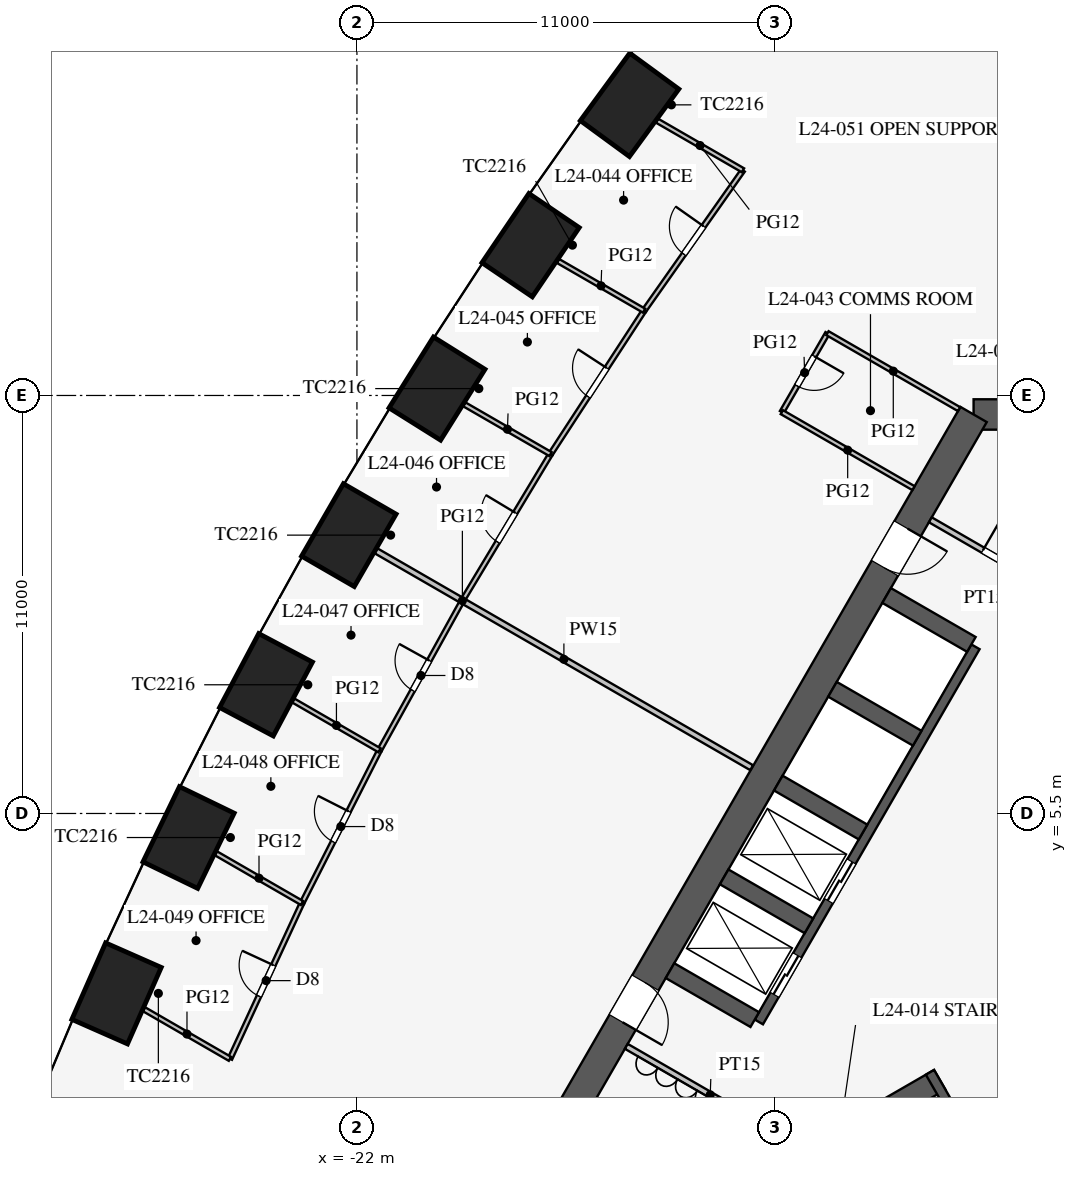
"""IFC4 building model, lengths in metres.
Left out: names, types, materials, properties, quantities, classifications, styles, units other than length and angle.
Written with IfcOpenShell. Run it as: python <this file> out.ifc"""

import sys

from ifc_helpers import new_model, si_unit, direction, frame, frame_2d, origin, origin_2d, place, context, subcontext, project, spatial, rectangle, extrude, element, fill, save


model = new_model("IFC4")
c1 = context("Model", 3, precision=1e-05, world=origin(), true_north=direction((0.0, 1.0)))
c2 = subcontext(c1, "Body", "Model", "MODEL_VIEW")
j1 = project(units=[si_unit("LENGTHUNIT", "METRE"), si_unit("PLANEANGLEUNIT", "RADIAN")], contexts=[c1])
p1 = place(None, origin())
s1 = spatial("IfcSite", under=j1, at=p1, CompositionType="ELEMENT")
p2 = place(p1, origin())
s2 = spatial("IfcBuilding", under=s1, at=p2, CompositionType="ELEMENT")
p3 = place(p2, frame((0.0, 0.0, 107.3)))
s3 = spatial("IfcBuildingStorey", under=s2, at=p3, CompositionType="ELEMENT", Elevation=107.3)
for number, where, z_axis, x_axis in (
    (1, (-14.825, 24.148, 0.0), (0.0, 0.0, 1.0), (-0.591, -0.807, 0.0)),
    (2, (-17.43, 20.456, 0.0), (0.0, 0.0, 1.0), (-0.561, -0.828, 0.0)),
    (3, (-19.893, 16.681, 0.0), (0.0, 0.0, 1.0), (-0.531, -0.847, 0.0)),
    (4, (-22.213, 12.825, 0.0), (0.0, 0.0, 1.0), (-0.5, -0.866, 0.0)),
    (5, (-24.393, 8.887, 0.0), (0.0, 0.0, 1.0), (-0.468, -0.883, 0.0)),
    (6, (-26.43, 4.867, 0.0), (0.0, 0.0, 1.0), (-0.436, -0.9, 0.0)),
    (7, (-28.325, 0.765, 0.0), (0.0, 0.0, 1.0), (-0.403, -0.915, 0.0)),
):
    element("IfcColumn", number, at=place(p3, frame(where, z_axis=z_axis, x_axis=x_axis)), inside=s3, PredefinedType="COLUMN", context=c2, shape_type="SweptSolid", body=[
        extrude(rectangle(XDim=2.2, YDim=1.6, at=origin_2d()), origin(), (0.0, 0.0, 1.0), 4.2),
    ])
p4 = place(p3, frame((5.773, 16.0, 0.0), z_axis=(0.0, 0.0, 1.0), x_axis=(-1.0, 0.0, 0.0)))
e8 = element("IfcWall", 8, at=p4, inside=s3, PredefinedType="SHEAR", context=c2, shape_type="SweptSolid", body=[
    extrude(rectangle(XDim=11.547, YDim=0.8, at=frame_2d((5.773, 0.0))), origin(), (0.0, 0.0, 1.0), 4.2),
])
p5 = place(p3, frame((-5.773, 16.0, 0.0), z_axis=(0.0, 0.0, 1.0), x_axis=(-0.500002442456, -0.866023993627, 0.0)))
e9 = element("IfcWall", 9, at=p5, inside=s3, PredefinedType="SHEAR", context=c2, shape_type="SweptSolid", body=[
    extrude(rectangle(XDim=21.939, YDim=0.8, at=frame_2d((10.97, 0.0))), origin(), (0.0, 0.0, 1.0), 4.2),
])
p6 = place(p5, frame((17.27, 0.0, 0.0)))
e10 = element("IfcOpeningElement", 10, at=p6, cuts=e9, PredefinedType="OPENING", context=c2, shape_type="SweptSolid", body=[
    extrude(rectangle(XDim=1.2, YDim=2.1, at=frame_2d((0.6, 1.05))), frame((0.0, 0.41, 0.0), z_axis=(0.0, -1.0, 0.0), x_axis=(1.0, 0.0, 0.0)), (0.0, 0.0, 1.0), 0.82),
])
p7 = place(p5, frame((3.47, 0.0, 0.0)))
e11 = element("IfcOpeningElement", 11, at=p7, cuts=e9, PredefinedType="OPENING", context=c2, shape_type="SweptSolid", body=[
    extrude(rectangle(XDim=1.2, YDim=2.1, at=frame_2d((0.6, 1.05))), frame((0.0, 0.41, 0.0), z_axis=(0.0, -1.0, 0.0), x_axis=(1.0, 0.0, 0.0)), (0.0, 0.0, 1.0), 0.82),
])
p8 = place(p3, frame((-5.724, 9.886, 0.0), z_axis=(0.0, 0.0, 1.0), x_axis=(-0.500001763848, -0.866024385424, 0.0)))
e12 = element("IfcWall", 12, at=p8, inside=s3, PredefinedType="SHEAR", context=c2, shape_type="SweptSolid", body=[
    extrude(rectangle(XDim=11.4, YDim=0.25, at=frame_2d((5.7, 0.0))), origin(), (0.0, 0.0, 1.0), 4.2),
])
p9 = place(p8, frame((6.525, 0.0, 0.0)))
e13 = element("IfcOpeningElement", 13, at=p9, cuts=e12, PredefinedType="OPENING", context=c2, shape_type="SweptSolid", body=[
    extrude(rectangle(XDim=1.2, YDim=2.2, at=frame_2d((0.6, 1.1))), frame((0.0, 0.135, 0.0), z_axis=(0.0, -1.0, 0.0), x_axis=(1.0, 0.0, 0.0)), (0.0, 0.0, 1.0), 0.27),
])
p10 = place(p8, frame((9.375, 0.0, 0.0)))
e14 = element("IfcOpeningElement", 14, at=p10, cuts=e12, PredefinedType="OPENING", context=c2, shape_type="SweptSolid", body=[
    extrude(rectangle(XDim=1.2, YDim=2.2, at=frame_2d((0.6, 1.1))), frame((0.0, 0.135, 0.0), z_axis=(0.0, -1.0, 0.0), x_axis=(1.0, 0.0, 0.0)), (0.0, 0.0, 1.0), 0.27),
])
p11 = place(p3, frame((-5.832, 9.949, 0.0), z_axis=(0.0, 0.0, 1.0), x_axis=(-0.866029291668, 0.499993265928, 0.0)))
e15 = element("IfcWall", 15, at=p11, inside=s3, PredefinedType="SHEAR", context=c2, shape_type="SweptSolid", body=[
    extrude(rectangle(XDim=2.575, YDim=0.45, at=frame_2d((1.288, 0.0))), origin(), (0.0, 0.0, 1.0), 4.2),
])
for number, where, z_axis, x_axis in (
    (16, (-7.257, 7.481, 0.0), (0.0, 0.0, 1.0), (-0.866, 0.5, 0.0)),
    (17, (-8.682, 5.012, 0.0), (0.0, 0.0, 1.0), (-0.866, 0.5, 0.0)),
    (18, (-10.107, 2.544, 0.0), (0.0, 0.0, 1.0), (-0.866, 0.5, 0.0)),
    (19, (-11.532, 0.076, 0.0), (0.0, 0.0, 1.0), (-0.866, 0.5, 0.0)),
):
    element("IfcWall", number, at=place(p3, frame(where, z_axis=z_axis, x_axis=x_axis)), inside=s3, PredefinedType="SHEAR", context=c2, shape_type="SweptSolid", body=[
        extrude(rectangle(XDim=2.575, YDim=0.45, at=frame_2d((1.288, 0.0))), origin(), (0.0, 0.0, 1.0), 4.2),
    ])
p12 = place(p3, frame((-6.663, -1.509, 0.0), z_axis=(0.0, 0.0, 1.0), x_axis=(-0.866019375473, -0.500010441196, 0.0)))
e20 = element("IfcWall", 20, at=p12, inside=s3, PredefinedType="SHEAR", context=c2, shape_type="SweptSolid", body=[
    extrude(rectangle(XDim=9.075, YDim=0.6, at=frame_2d((4.538, 0.0))), origin(), (0.0, 0.0, 1.0), 4.2),
])
p13 = place(p3, frame((-6.922, -1.312, 0.0), z_axis=(0.0, 0.0, 1.0), x_axis=(0.499984536904, -0.866034331223, 0.0)))
e21 = element("IfcWall", 21, at=p13, inside=s3, PredefinedType="SHEAR", context=c2, shape_type="SweptSolid", body=[
    extrude(rectangle(XDim=4.65, YDim=0.25, at=frame_2d((2.325, 0.0))), origin(), (0.0, 0.0, 1.0), 4.2),
])
p14 = place(p13, frame((1.525, 0.0, 0.0)))
e22 = element("IfcOpeningElement", 22, at=p14, cuts=e21, PredefinedType="OPENING", context=c2, shape_type="SweptSolid", body=[
    extrude(rectangle(XDim=1.6, YDim=2.1, at=frame_2d((0.8, 1.05))), frame((0.0, 0.135, 0.0), z_axis=(0.0, -1.0, 0.0), x_axis=(1.0, 0.0, 0.0)), (0.0, 0.0, 1.0), 0.27),
])
p15 = place(p3, frame((-10.495, -3.178, 0.0), z_axis=(0.0, 0.0, 1.0), x_axis=(-0.86602216432, 0.500005610874, 0.0)))
e23 = element("IfcWall", 23, at=p15, inside=s3, PredefinedType="PARTITIONING", context=c2, shape_type="SweptSolid", body=[
    extrude(rectangle(XDim=5.1, YDim=0.15, at=frame_2d((2.55, 0.0))), origin(), (0.0, 0.0, 1.0), 4.0),
])
p16 = place(p15, frame((1.3, 0.0, 0.0)))
e24 = element("IfcOpeningElement", 24, at=p16, cuts=e23, PredefinedType="OPENING", context=c2, shape_type="SweptSolid", body=[
    extrude(rectangle(XDim=0.9, YDim=2.1, at=frame_2d((0.45, 1.05))), frame((0.0, 0.085, 0.0), z_axis=(0.0, -1.0, 0.0), x_axis=(1.0, 0.0, 0.0)), (0.0, 0.0, 1.0), 0.17),
])
p17 = place(p3, frame((-2.495, 10.678, 0.0), z_axis=(0.0, 0.0, 1.0), x_axis=(-0.86602216432, 0.500005610874, 0.0)))
e25 = element("IfcWall", 25, at=p17, inside=s3, PredefinedType="PARTITIONING", context=c2, shape_type="SweptSolid", body=[
    extrude(rectangle(XDim=5.1, YDim=0.15, at=frame_2d((2.55, 0.0))), origin(), (0.0, 0.0, 1.0), 4.0),
])
p18 = place(p17, frame((2.6, 0.0, 0.0)))
e26 = element("IfcOpeningElement", 26, at=p18, cuts=e25, PredefinedType="OPENING", context=c2, shape_type="SweptSolid", body=[
    extrude(rectangle(XDim=0.9, YDim=2.1, at=frame_2d((0.45, 1.05))), frame((0.0, 0.085, 0.0), z_axis=(0.0, -1.0, 0.0), x_axis=(1.0, 0.0, 0.0)), (0.0, 0.0, 1.0), 0.17),
])
p19 = place(p3, frame((-11.613, 6.705, 0.0), z_axis=(0.0, 0.0, 1.0), x_axis=(-0.866026306654, 0.499998436182, 0.0)))
e27 = element("IfcWall", 27, at=p19, inside=s3, PredefinedType="PARTITIONING", context=c2, shape_type="SweptSolid", body=[
    extrude(rectangle(XDim=11.41, YDim=0.15, at=frame_2d((5.705, 0.0))), origin(), (0.0, 0.0, 1.0), 2.8),
])
p20 = place(p3, frame((-9.619, 18.14, 0.0), z_axis=(0.0, 0.0, 1.0), x_axis=(-0.500001309137, -0.866024647952, 0.0)))
e28 = element("IfcWall", 28, at=p20, inside=s3, PredefinedType="PARTITIONING", context=c2, shape_type="SweptSolid", body=[
    extrude(rectangle(XDim=2.4, YDim=0.12, at=frame_2d((1.2, 0.0))), origin(), (0.0, 0.0, 1.0), 2.9),
])
p21 = place(p20, frame((0.7, 0.0, 0.15)))
e29 = element("IfcOpeningElement", 29, at=p21, cuts=e28, PredefinedType="OPENING", context=c2, shape_type="SweptSolid", body=[
    extrude(rectangle(XDim=0.9, YDim=2.1, at=frame_2d((0.45, 1.05))), frame((0.0, 0.07, 0.0), z_axis=(0.0, -1.0, 0.0), x_axis=(1.0, 0.0, 0.0)), (0.0, 0.0, 1.0), 0.14),
])
for number, where, z_axis, x_axis in (
    (30, (-6.155, 16.14, 0.0), (0.0, 0.0, 1.0), (-0.866, 0.5, 0.0)),
    (31, (-7.355, 14.061, 0.0), (0.0, 0.0, 1.0), (-0.866, 0.5, 0.0)),
):
    element("IfcWall", number, at=place(p3, frame(where, z_axis=z_axis, x_axis=x_axis)), inside=s3, PredefinedType="PARTITIONING", context=c2, shape_type="SweptSolid", body=[
        extrude(rectangle(XDim=4.0, YDim=0.12, at=frame_2d((2.0, 0.0))), origin(), (0.0, 0.0, 1.0), 2.9),
    ])
p22 = place(p3, frame((-19.226, 11.1, 0.0), z_axis=(0.0, 0.0, 1.0), x_axis=(-0.484292898211, -0.874905931368, 0.0)))
e32 = element("IfcWall", 32, at=p22, inside=s3, PredefinedType="PARTITIONING", context=c2, shape_type="SweptSolid", body=[
    extrude(rectangle(XDim=4.501, YDim=0.12, at=frame_2d((2.25, 0.0))), origin(), (0.0, 0.0, 1.0), 2.9),
])
p23 = place(p22, frame((1.8, 0.0, 0.15)))
e33 = element("IfcOpeningElement", 33, at=p23, cuts=e32, PredefinedType="OPENING", context=c2, shape_type="SweptSolid", body=[
    extrude(rectangle(XDim=0.9, YDim=2.1, at=frame_2d((0.45, 1.05))), frame((0.0, 0.07, 0.0), z_axis=(0.0, -1.0, 0.0), x_axis=(1.0, 0.0, 0.0)), (0.0, 0.0, 1.0), 0.14),
])
p24 = place(p3, frame((-21.405, 7.162, 0.0), z_axis=(0.0, 0.0, 1.0), x_axis=(-0.452471679136, -0.891778772779, 0.0)))
e34 = element("IfcWall", 34, at=p24, inside=s3, PredefinedType="PARTITIONING", context=c2, shape_type="SweptSolid", body=[
    extrude(rectangle(XDim=4.507, YDim=0.12, at=frame_2d((2.253, 0.0))), origin(), (0.0, 0.0, 1.0), 2.9),
])
p25 = place(p24, frame((1.8, 0.0, 0.15)))
e35 = element("IfcOpeningElement", 35, at=p25, cuts=e34, PredefinedType="OPENING", context=c2, shape_type="SweptSolid", body=[
    extrude(rectangle(XDim=0.9, YDim=2.1, at=frame_2d((0.45, 1.05))), frame((0.0, 0.07, 0.0), z_axis=(0.0, -1.0, 0.0), x_axis=(1.0, 0.0, 0.0)), (0.0, 0.0, 1.0), 0.14),
])
p26 = place(p3, frame((-23.444, 3.143, 0.0), z_axis=(0.0, 0.0, 1.0), x_axis=(-0.419883773418, -0.907577884713, 0.0)))
e36 = element("IfcWall", 36, at=p26, inside=s3, PredefinedType="PARTITIONING", context=c2, shape_type="SweptSolid", body=[
    extrude(rectangle(XDim=4.519, YDim=0.12, at=frame_2d((2.259, 0.0))), origin(), (0.0, 0.0, 1.0), 2.9),
])
p27 = place(p26, frame((1.8, 0.0, 0.15)))
e37 = element("IfcOpeningElement", 37, at=p27, cuts=e36, PredefinedType="OPENING", context=c2, shape_type="SweptSolid", body=[
    extrude(rectangle(XDim=0.9, YDim=2.1, at=frame_2d((0.45, 1.05))), frame((0.0, 0.07, 0.0), z_axis=(0.0, -1.0, 0.0), x_axis=(1.0, 0.0, 0.0)), (0.0, 0.0, 1.0), 0.14),
])
p28 = place(p3, frame((-11.842, 22.425, 0.0), z_axis=(0.0, 0.0, 1.0), x_axis=(-0.576023283708, -0.817433285734, 0.0)))
e38 = element("IfcWall", 38, at=p28, inside=s3, PredefinedType="PARTITIONING", context=c2, shape_type="SweptSolid", body=[
    extrude(rectangle(XDim=4.519, YDim=0.12, at=frame_2d((2.259, 0.0))), origin(), (0.0, 0.0, 1.0), 2.9),
])
p29 = place(p28, frame((1.8, 0.0, 0.15)))
e39 = element("IfcOpeningElement", 39, at=p29, cuts=e38, PredefinedType="OPENING", context=c2, shape_type="SweptSolid", body=[
    extrude(rectangle(XDim=0.9, YDim=2.1, at=frame_2d((0.45, 1.05))), frame((0.0, 0.07, 0.0), z_axis=(0.0, -1.0, 0.0), x_axis=(1.0, 0.0, 0.0)), (0.0, 0.0, 1.0), 0.14),
])
p30 = place(p3, frame((-16.905, 14.956, 0.0), z_axis=(0.0, 0.0, 1.0), x_axis=(-0.515548366618, -0.856860479703, 0.0)))
e40 = element("IfcWall", 40, at=p30, inside=s3, PredefinedType="PARTITIONING", context=c2, shape_type="SweptSolid", body=[
    extrude(rectangle(XDim=4.501, YDim=0.12, at=frame_2d((2.25, 0.0))), origin(), (0.0, 0.0, 1.0), 2.9),
])
p31 = place(p30, frame((1.8, 0.0, 0.15)))
e41 = element("IfcOpeningElement", 41, at=p31, cuts=e40, PredefinedType="OPENING", context=c2, shape_type="SweptSolid", body=[
    extrude(rectangle(XDim=0.9, YDim=2.1, at=frame_2d((0.45, 1.05))), frame((0.0, 0.07, 0.0), z_axis=(0.0, -1.0, 0.0), x_axis=(1.0, 0.0, 0.0)), (0.0, 0.0, 1.0), 0.14),
])
p32 = place(p3, frame((-14.444, 18.732, 0.0), z_axis=(0.0, 0.0, 1.0), x_axis=(-0.546069464151, -0.837739900161, 0.0)))
e42 = element("IfcWall", 42, at=p32, inside=s3, PredefinedType="PARTITIONING", context=c2, shape_type="SweptSolid", body=[
    extrude(rectangle(XDim=4.507, YDim=0.12, at=frame_2d((2.253, 0.0))), origin(), (0.0, 0.0, 1.0), 2.9),
])
p33 = place(p32, frame((1.8, 0.0, 0.15)))
e43 = element("IfcOpeningElement", 43, at=p33, cuts=e42, PredefinedType="OPENING", context=c2, shape_type="SweptSolid", body=[
    extrude(rectangle(XDim=0.9, YDim=2.1, at=frame_2d((0.45, 1.05))), frame((0.0, 0.07, 0.0), z_axis=(0.0, -1.0, 0.0), x_axis=(1.0, 0.0, 0.0)), (0.0, 0.0, 1.0), 0.14),
])
p34 = place(p3, frame((-25.342, -0.958, 0.0), z_axis=(0.0, 0.0, 1.0), x_axis=(-0.866036074319, 0.499981517636, 0.0)))
e44 = element("IfcWall", 44, at=p34, inside=s3, PredefinedType="PARTITIONING", context=c2, shape_type="SweptSolid", body=[
    extrude(rectangle(XDim=2.61, YDim=0.12, at=frame_2d((1.305, 0.0))), origin(), (0.0, 0.0, 1.0), 2.6),
])
p35 = place(p3, frame((-21.405, 7.162, 0.0), z_axis=(0.0, 0.0, 1.0), x_axis=(-0.866008611403, 0.50002908413, 0.0)))
e45 = element("IfcWall", 45, at=p35, inside=s3, PredefinedType="PARTITIONING", context=c2, shape_type="SweptSolid", body=[
    extrude(rectangle(XDim=2.619, YDim=0.12, at=frame_2d((1.31, 0.0))), origin(), (0.0, 0.0, 1.0), 2.8),
])
p36 = place(p3, frame((-23.444, 3.143, 0.0), z_axis=(0.0, 0.0, 1.0), x_axis=(-0.866011491631, 0.500024095782, 0.0)))
e46 = element("IfcWall", 46, at=p36, inside=s3, PredefinedType="PARTITIONING", context=c2, shape_type="SweptSolid", body=[
    extrude(rectangle(XDim=2.615, YDim=0.12, at=frame_2d((1.308, 0.0))), origin(), (0.0, 0.0, 1.0), 2.9),
])
p37 = place(p3, frame((-11.842, 22.425, 0.0), z_axis=(0.0, 0.0, 1.0), x_axis=(-0.866036074319, 0.499981517636, 0.0)))
e47 = element("IfcWall", 47, at=p37, inside=s3, PredefinedType="PARTITIONING", context=c2, shape_type="SweptSolid", body=[
    extrude(rectangle(XDim=2.61, YDim=0.12, at=frame_2d((1.305, 0.0))), origin(), (0.0, 0.0, 1.0), 2.6),
])
p38 = place(p3, frame((-16.905, 14.956, 0.0), z_axis=(0.0, 0.0, 1.0), x_axis=(-0.866008611403, 0.50002908413, 0.0)))
e48 = element("IfcWall", 48, at=p38, inside=s3, PredefinedType="PARTITIONING", context=c2, shape_type="SweptSolid", body=[
    extrude(rectangle(XDim=2.619, YDim=0.12, at=frame_2d((1.31, 0.0))), origin(), (0.0, 0.0, 1.0), 2.8),
])
p39 = place(p3, frame((-14.444, 18.732, 0.0), z_axis=(0.0, 0.0, 1.0), x_axis=(-0.866011491631, 0.500024095782, 0.0)))
e49 = element("IfcWall", 49, at=p39, inside=s3, PredefinedType="PARTITIONING", context=c2, shape_type="SweptSolid", body=[
    extrude(rectangle(XDim=2.615, YDim=0.12, at=frame_2d((1.308, 0.0))), origin(), (0.0, 0.0, 1.0), 2.9),
])
p40 = place(p18, frame((0.9, 0.0, 0.0), z_axis=(0.0, 0.0, 1.0), x_axis=(-1.0, 0.0, 0.0)))
e50 = element("IfcDoor", 50, at=p40, inside=s3, OperationType="SINGLE_SWING_LEFT", PredefinedType="DOOR", context=c2, shape_type="SweptSolid", body=[
    extrude(rectangle(XDim=0.9, YDim=2.1, at=frame_2d((0.45, 1.05))), frame((0.0, 0.025, 0.0), z_axis=(0.0, -1.0, 0.0), x_axis=(1.0, 0.0, 0.0)), (0.0, 0.0, 1.0), 0.05),
])
fill(e26, e50)
p41 = place(p6, origin())
e51 = element("IfcDoor", 51, at=p41, inside=s3, OperationType="SINGLE_SWING_RIGHT", PredefinedType="DOOR", context=c2, shape_type="SweptSolid", body=[
    extrude(rectangle(XDim=1.2, YDim=2.1, at=frame_2d((0.6, 1.05))), frame((0.0, 0.025, 0.0), z_axis=(0.0, -1.0, 0.0), x_axis=(1.0, 0.0, 0.0)), (0.0, 0.0, 1.0), 0.05),
])
fill(e10, e51)
p42 = place(p7, origin())
e52 = element("IfcDoor", 52, at=p42, inside=s3, OperationType="SINGLE_SWING_LEFT", PredefinedType="DOOR", context=c2, shape_type="SweptSolid", body=[
    extrude(rectangle(XDim=1.2, YDim=2.1, at=frame_2d((0.6, 1.05))), frame((0.0, 0.025, 0.0), z_axis=(0.0, -1.0, 0.0), x_axis=(1.0, 0.0, 0.0)), (0.0, 0.0, 1.0), 0.05),
])
fill(e11, e52)
p43 = place(p21, origin())
e53 = element("IfcDoor", 53, at=p43, inside=s3, OperationType="SINGLE_SWING_LEFT", PredefinedType="DOOR", context=c2, shape_type="SweptSolid", body=[
    extrude(rectangle(XDim=0.9, YDim=2.1, at=frame_2d((0.45, 1.05))), frame((0.0, 0.025, 0.0), z_axis=(0.0, -1.0, 0.0), x_axis=(1.0, 0.0, 0.0)), (0.0, 0.0, 1.0), 0.05),
])
fill(e29, e53)
p44 = place(p29, frame((0.9, 0.0, 0.0), z_axis=(0.0, 0.0, 1.0), x_axis=(-1.0, 0.0, 0.0)))
e54 = element("IfcDoor", 54, at=p44, inside=s3, OperationType="SINGLE_SWING_RIGHT", PredefinedType="DOOR", context=c2, shape_type="SweptSolid", body=[
    extrude(rectangle(XDim=0.9, YDim=2.1, at=frame_2d((0.45, 1.05))), frame((0.0, 0.025, 0.0), z_axis=(0.0, -1.0, 0.0), x_axis=(1.0, 0.0, 0.0)), (0.0, 0.0, 1.0), 0.05),
])
fill(e39, e54)
p45 = place(p33, frame((0.9, 0.0, 0.0), z_axis=(0.0, 0.0, 1.0), x_axis=(-1.0, 0.0, 0.0)))
e55 = element("IfcDoor", 55, at=p45, inside=s3, OperationType="SINGLE_SWING_RIGHT", PredefinedType="DOOR", context=c2, shape_type="SweptSolid", body=[
    extrude(rectangle(XDim=0.9, YDim=2.1, at=frame_2d((0.45, 1.05))), frame((0.0, 0.025, 0.0), z_axis=(0.0, -1.0, 0.0), x_axis=(1.0, 0.0, 0.0)), (0.0, 0.0, 1.0), 0.05),
])
fill(e43, e55)
p46 = place(p31, frame((0.9, 0.0, 0.0), z_axis=(0.0, 0.0, 1.0), x_axis=(-1.0, 0.0, 0.0)))
e56 = element("IfcDoor", 56, at=p46, inside=s3, OperationType="SINGLE_SWING_RIGHT", PredefinedType="DOOR", context=c2, shape_type="SweptSolid", body=[
    extrude(rectangle(XDim=0.9, YDim=2.1, at=frame_2d((0.45, 1.05))), frame((0.0, 0.025, 0.0), z_axis=(0.0, -1.0, 0.0), x_axis=(1.0, 0.0, 0.0)), (0.0, 0.0, 1.0), 0.05),
])
fill(e41, e56)
p47 = place(p23, frame((0.9, 0.0, 0.0), z_axis=(0.0, 0.0, 1.0), x_axis=(-1.0, 0.0, 0.0)))
e57 = element("IfcDoor", 57, at=p47, inside=s3, OperationType="SINGLE_SWING_RIGHT", PredefinedType="DOOR", context=c2, shape_type="SweptSolid", body=[
    extrude(rectangle(XDim=0.9, YDim=2.1, at=frame_2d((0.45, 1.05))), frame((0.0, 0.025, 0.0), z_axis=(0.0, -1.0, 0.0), x_axis=(1.0, 0.0, 0.0)), (0.0, 0.0, 1.0), 0.05),
])
fill(e33, e57)
p48 = place(p25, frame((0.9, 0.0, 0.0), z_axis=(0.0, 0.0, 1.0), x_axis=(-1.0, 0.0, 0.0)))
e58 = element("IfcDoor", 58, at=p48, inside=s3, OperationType="SINGLE_SWING_RIGHT", PredefinedType="DOOR", context=c2, shape_type="SweptSolid", body=[
    extrude(rectangle(XDim=0.9, YDim=2.1, at=frame_2d((0.45, 1.05))), frame((0.0, 0.025, 0.0), z_axis=(0.0, -1.0, 0.0), x_axis=(1.0, 0.0, 0.0)), (0.0, 0.0, 1.0), 0.05),
])
fill(e35, e58)
p49 = place(p27, frame((0.9, 0.0, 0.0), z_axis=(0.0, 0.0, 1.0), x_axis=(-1.0, 0.0, 0.0)))
e59 = element("IfcDoor", 59, at=p49, inside=s3, OperationType="SINGLE_SWING_RIGHT", PredefinedType="DOOR", context=c2, shape_type="SweptSolid", body=[
    extrude(rectangle(XDim=0.9, YDim=2.1, at=frame_2d((0.45, 1.05))), frame((0.0, 0.025, 0.0), z_axis=(0.0, -1.0, 0.0), x_axis=(1.0, 0.0, 0.0)), (0.0, 0.0, 1.0), 0.05),
])
fill(e37, e59)
p50 = place(p9, origin())
e60 = element("IfcDoor", 60, at=p50, inside=s3, OperationType="DOUBLE_DOOR_SLIDING", PredefinedType="DOOR", context=c2, shape_type="SweptSolid", body=[
    extrude(rectangle(XDim=1.2, YDim=2.2, at=frame_2d((0.6, 1.1))), frame((0.0, 0.025, 0.0), z_axis=(0.0, -1.0, 0.0), x_axis=(1.0, 0.0, 0.0)), (0.0, 0.0, 1.0), 0.05),
])
fill(e13, e60)
p51 = place(p10, origin())
e61 = element("IfcDoor", 61, at=p51, inside=s3, OperationType="DOUBLE_DOOR_SLIDING", PredefinedType="DOOR", context=c2, shape_type="SweptSolid", body=[
    extrude(rectangle(XDim=1.2, YDim=2.2, at=frame_2d((0.6, 1.1))), frame((0.0, 0.025, 0.0), z_axis=(0.0, -1.0, 0.0), x_axis=(1.0, 0.0, 0.0)), (0.0, 0.0, 1.0), 0.05),
])
fill(e14, e61)
save(model, sys.argv[1])
